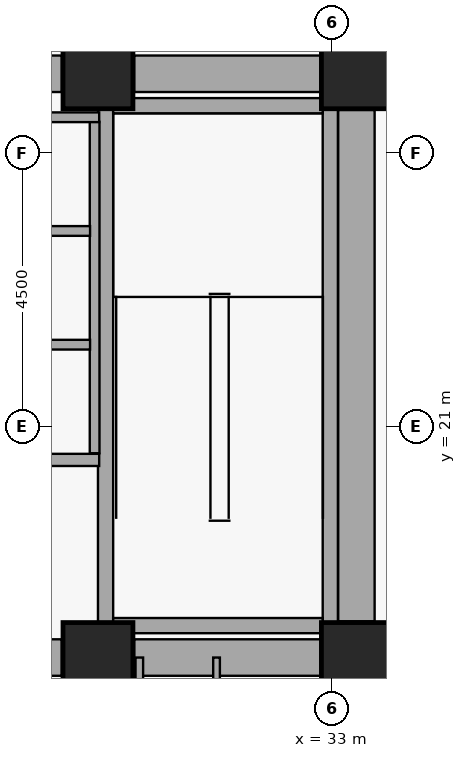
"""IFC4 building model, lengths in metres.
Left out: names, types, materials, properties, quantities, classifications, styles, units other than length and angle.
Written with IfcOpenShell. Run it as: python <this file> out.ifc"""

import sys

from ifc_helpers import new_model, si_unit, direction, frame, frame_2d, origin, origin_2d, place, context, subcontext, project, spatial, rectangle, extrude, element, fill, save


model = new_model("IFC4")
c1 = context("Model", 3, precision=1e-05, world=origin(), true_north=direction((0.0, 1.0)))
c2 = subcontext(c1, "Body", "Model", "MODEL_VIEW")
j1 = project(units=[si_unit("LENGTHUNIT", "METRE"), si_unit("PLANEANGLEUNIT", "RADIAN")], contexts=[c1])
p1 = place(None, origin())
s1 = spatial("IfcSite", under=j1, at=p1, CompositionType="ELEMENT")
p2 = place(p1, origin())
s2 = spatial("IfcBuilding", under=s1, at=p2, CompositionType="ELEMENT")
p3 = place(p2, frame((0.0, 0.0, 68.52)))
s3 = spatial("IfcBuildingStorey", under=s2, at=p3, CompositionType="ELEMENT", Elevation=68.52)
for number, where, z_axis, x_axis in (
    (1, (29.15, 17.2, 0.0), (0.0, 0.0, 1.0), (1.0, 0.0, 0.0)),
    (2, (33.4, 17.2, 0.0), (0.0, 0.0, 1.0), (1.0, 0.0, 0.0)),
    (3, (29.15, 26.8, 0.0), (0.0, 0.0, 1.0), (1.0, 0.0, 0.0)),
    (4, (33.4, 26.8, 0.0), (0.0, 0.0, 1.0), (1.0, 0.0, 0.0)),
):
    element("IfcColumn", number, at=place(p3, frame(where, z_axis=z_axis, x_axis=x_axis)), inside=s3, PredefinedType="COLUMN", context=c2, shape_type="SweptSolid", body=[
        extrude(rectangle(XDim=1.15, YDim=1.15, at=origin_2d()), origin(), (0.0, 0.0, 1.0), 3.72),
    ])
p4 = place(p3, frame((26.85, 17.2, 0.0), z_axis=(0.0, 0.0, 1.0), x_axis=(1.0, 0.0, 0.0)))
e5 = element("IfcWall", 5, at=p4, inside=s3, PredefinedType="SHEAR", context=c2, shape_type="SweptSolid", body=[
    extrude(rectangle(XDim=1.705, YDim=0.6, at=frame_2d((0.853, 0.0))), origin(), (0.0, 0.0, 1.0), 3.47),
])
p5 = place(p3, frame((29.745, 17.2, 0.0), z_axis=(0.0, 0.0, 1.0), x_axis=(1.0, 0.0, 0.0)))
e6 = element("IfcWall", 6, at=p5, inside=s3, PredefinedType="SHEAR", context=c2, shape_type="SweptSolid", body=[
    extrude(rectangle(XDim=3.06, YDim=0.6, at=frame_2d((1.53, 0.0))), origin(), (0.0, 0.0, 1.0), 3.47),
])
p6 = place(p3, frame((26.85, 26.8, 0.0), z_axis=(0.0, 0.0, 1.0), x_axis=(1.0, 0.0, 0.0)))
e7 = element("IfcWall", 7, at=p6, inside=s3, PredefinedType="SHEAR", context=c2, shape_type="SweptSolid", body=[
    extrude(rectangle(XDim=1.705, YDim=0.6, at=frame_2d((0.853, 0.0))), origin(), (0.0, 0.0, 1.0), 3.47),
])
p7 = place(p3, frame((29.745, 26.8, 0.0), z_axis=(0.0, 0.0, 1.0), x_axis=(1.0, 0.0, 0.0)))
e8 = element("IfcWall", 8, at=p7, inside=s3, PredefinedType="SHEAR", context=c2, shape_type="SweptSolid", body=[
    extrude(rectangle(XDim=3.06, YDim=0.6, at=frame_2d((1.53, 0.0))), origin(), (0.0, 0.0, 1.0), 3.47),
])
p8 = place(p3, frame((33.4, 17.795, 0.0), z_axis=(0.0, 0.0, 1.0), x_axis=(0.0, 1.0, 0.0)))
e9 = element("IfcWall", 9, at=p8, inside=s3, PredefinedType="SHEAR", context=c2, shape_type="SweptSolid", body=[
    extrude(rectangle(XDim=8.41, YDim=0.6, at=frame_2d((4.205, 0.0))), origin(), (0.0, 0.0, 1.0), 3.47),
])
p9 = place(p3, frame((29.275, 17.6, 0.0), z_axis=(0.0, 0.0, 1.0), x_axis=(0.0, 1.0, 0.0)))
e10 = element("IfcWall", 10, at=p9, inside=s3, PredefinedType="SHEAR", context=c2, shape_type="SweptSolid", body=[
    extrude(rectangle(XDim=8.8, YDim=0.25, at=frame_2d((4.4, 0.0))), origin(), (0.0, 0.0, 1.0), 3.47),
])
p10 = place(p9, frame((0.35, 0.0, 0.0)))
e11 = element("IfcOpeningElement", 11, at=p10, cuts=e10, PredefinedType="OPENING", context=c2, shape_type="SweptSolid", body=[
    extrude(rectangle(XDim=1.05, YDim=2.08, at=frame_2d((0.525, 1.04))), frame((0.0, 0.135, 0.0), z_axis=(0.0, -1.0, 0.0), x_axis=(1.0, 0.0, 0.0)), (0.0, 0.0, 1.0), 0.27),
])
p11 = place(p3, frame((32.971, 17.6, 0.0), z_axis=(0.0, 0.0, 1.0), x_axis=(0.0, 1.0, 0.0)))
e12 = element("IfcWall", 12, at=p11, inside=s3, PredefinedType="SHEAR", context=c2, shape_type="SweptSolid", body=[
    extrude(rectangle(XDim=8.8, YDim=0.25, at=frame_2d((4.4, 0.0))), origin(), (0.0, 0.0, 1.0), 3.47),
])
for number, where, z_axis, x_axis in (
    (13, (29.4, 17.725, 0.0), (0.0, 0.0, 1.0), (1.0, 0.0, 0.0)),
    (14, (29.4, 26.275, 0.0), (0.0, 0.0, 1.0), (1.0, 0.0, 0.0)),
):
    element("IfcWall", number, at=place(p3, frame(where, z_axis=z_axis, x_axis=x_axis)), inside=s3, PredefinedType="SHEAR", context=c2, shape_type="SweptSolid", body=[
        extrude(rectangle(XDim=3.446, YDim=0.25, at=frame_2d((1.723, 0.0))), origin(), (0.0, 0.0, 1.0), 3.47),
    ])
p12 = place(p3, frame((26.37, 20.45, 0.0), z_axis=(0.0, 0.0, 1.0), x_axis=(1.0, 0.0, 0.0)))
e15 = element("IfcWall", 15, at=p12, inside=s3, PredefinedType="PARTITIONING", context=c2, shape_type="SweptSolid", body=[
    extrude(rectangle(XDim=2.8, YDim=0.2, at=frame_2d((1.4, 0.0))), origin(), (0.0, 0.0, 1.0), 3.47),
])
p13 = place(p12, frame((0.78, 0.0, 0.0)))
e16 = element("IfcOpeningElement", 16, at=p13, cuts=e15, PredefinedType="OPENING", context=c2, shape_type="SweptSolid", body=[
    extrude(rectangle(XDim=1.1, YDim=2.08, at=frame_2d((0.55, 1.04))), frame((0.0, 0.11, 0.0), z_axis=(0.0, -1.0, 0.0), x_axis=(1.0, 0.0, 0.0)), (0.0, 0.0, 1.0), 0.22),
])
p14 = place(p3, frame((29.095, 20.56, 0.0), z_axis=(0.0, 0.0, 1.0), x_axis=(0.0, 1.0, 0.0)))
e17 = element("IfcWall", 17, at=p14, inside=s3, PredefinedType="PARTITIONING", context=c2, shape_type="SweptSolid", body=[
    extrude(rectangle(XDim=5.45, YDim=0.16, at=frame_2d((2.725, 0.0))), origin(), (0.0, 0.0, 1.0), 3.47),
])
p15 = place(p3, frame((26.37, 22.345, 0.0), z_axis=(0.0, 0.0, 1.0), x_axis=(1.0, 0.0, 0.0)))
e18 = element("IfcWall", 18, at=p15, inside=s3, PredefinedType="PARTITIONING", context=c2, shape_type="SweptSolid", body=[
    extrude(rectangle(XDim=2.65, YDim=0.16, at=frame_2d((1.325, 0.0))), origin(), (0.0, 0.0, 1.0), 3.47),
])
p16 = place(p3, frame((26.53, 24.215, 0.0), z_axis=(0.0, 0.0, 1.0), x_axis=(1.0, 0.0, 0.0)))
e19 = element("IfcWall", 19, at=p16, inside=s3, PredefinedType="PARTITIONING", context=c2, shape_type="SweptSolid", body=[
    extrude(rectangle(XDim=2.49, YDim=0.16, at=frame_2d((1.245, 0.0))), origin(), (0.0, 0.0, 1.0), 3.47),
])
p17 = place(p3, frame((26.34, 26.085, 0.0), z_axis=(0.0, 0.0, 1.0), x_axis=(1.0, 0.0, 0.0)))
e20 = element("IfcWall", 20, at=p17, inside=s3, PredefinedType="PARTITIONING", context=c2, shape_type="SweptSolid", body=[
    extrude(rectangle(XDim=2.83, YDim=0.16, at=frame_2d((1.415, 0.0))), origin(), (0.0, 0.0, 1.0), 3.47),
])
p18 = place(p3, frame((29.83, 14.95, 0.0), z_axis=(0.0, 0.0, 1.0), x_axis=(0.0, 1.0, 0.0)))
e21 = element("IfcWall", 21, at=p18, inside=s3, PredefinedType="PARTITIONING", context=c2, shape_type="SweptSolid", body=[
    extrude(rectangle(XDim=2.25, YDim=0.125, at=frame_2d((1.125, 0.0))), origin(), (0.0, 0.0, 1.0), 2.6),
])
p19 = place(p3, frame((31.1, 14.95, 0.0), z_axis=(0.0, 0.0, 1.0), x_axis=(0.0, 1.0, 0.0)))
e22 = element("IfcWall", 22, at=p19, inside=s3, PredefinedType="PARTITIONING", context=c2, shape_type="SweptSolid", body=[
    extrude(rectangle(XDim=2.25, YDim=0.11, at=frame_2d((1.125, 0.0))), origin(), (0.0, 0.0, 1.0), 2.6),
])
p20 = place(p3, frame((33.74, 27.22, 0.0), z_axis=(0.0, 0.0, 1.0), x_axis=(-1.0, 0.0, 0.0)))
e23 = element("IfcWall", 23, at=p20, inside=s3, PredefinedType="PARTITIONING", context=c2, shape_type="SweptSolid", body=[
    extrude(rectangle(XDim=0.86, YDim=0.145, at=frame_2d((0.43, 0.0))), origin(), (0.0, 0.0, 1.0), 2.2),
])
p21 = place(p10, origin())
e24 = element("IfcDoor", 24, at=p21, inside=s3, OperationType="SINGLE_SWING_RIGHT", PredefinedType="DOOR", context=c2, shape_type="SweptSolid", body=[
    extrude(rectangle(XDim=1.05, YDim=2.08, at=frame_2d((0.525, 1.04))), frame((0.0, 0.025, 0.0), z_axis=(0.0, -1.0, 0.0), x_axis=(1.0, 0.0, 0.0)), (0.0, 0.0, 1.0), 0.05),
])
fill(e11, e24)
save(model, sys.argv[1])
